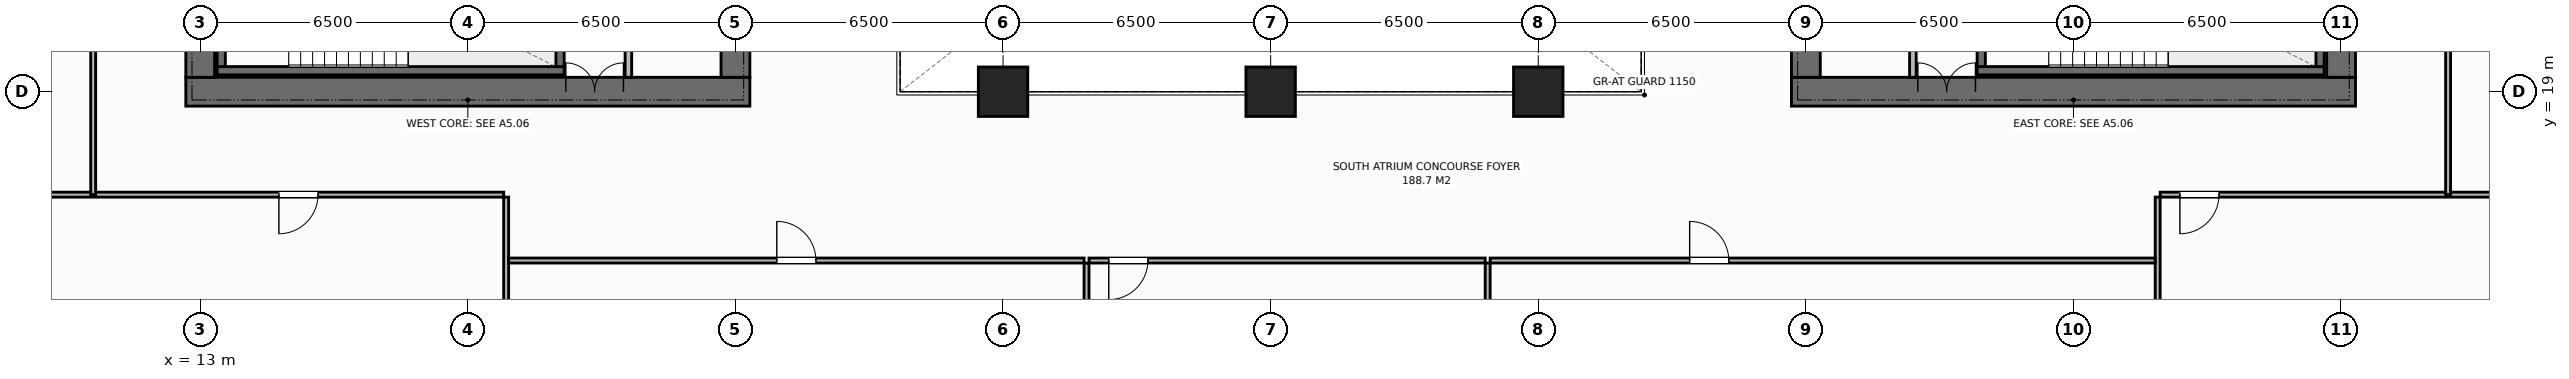
"""IFC4 building model, lengths in metres.
Left out: names, types, materials, properties, quantities, classifications, styles, units other than length and angle.
Written with IfcOpenShell. Run it as: python <this file> out.ifc"""

import sys

from ifc_helpers import new_model, si_unit, direction, frame, frame_2d, origin, origin_2d, place, context, subcontext, project, spatial, rectangle, extrude, element, fill, save


model = new_model("IFC4")
c1 = context("Model", 3, precision=1e-05, world=origin(), true_north=direction((0.0, 1.0)))
c2 = subcontext(c1, "Body", "Model", "MODEL_VIEW")
j1 = project(units=[si_unit("LENGTHUNIT", "METRE"), si_unit("PLANEANGLEUNIT", "RADIAN")], contexts=[c1])
p1 = place(None, origin())
s1 = spatial("IfcSite", under=j1, at=p1, CompositionType="ELEMENT")
p2 = place(p1, origin())
s2 = spatial("IfcBuilding", under=s1, at=p2, CompositionType="ELEMENT")
p3 = place(p2, frame((0.0, 0.0, 108.8)))
s3 = spatial("IfcBuildingStorey", under=s2, at=p3, CompositionType="ELEMENT", Elevation=108.8)
p4 = place(p3, frame((12.65, 19.0, 0.0), z_axis=(0.0, 0.0, 1.0), x_axis=(1.0, 0.0, 0.0)))
e1 = element("IfcWall", 1, at=p4, inside=s3, PredefinedType="SHEAR", context=c2, shape_type="SweptSolid", body=[
    extrude(rectangle(XDim=13.7, YDim=0.7, at=frame_2d((6.85, 0.0))), origin(), (0.0, 0.0, 1.0), 3.8),
])
p5 = place(p4, frame((9.23, 0.0, 0.0)))
e2 = element("IfcOpeningElement", 2, at=p5, cuts=e1, PredefinedType="OPENING", context=c2, shape_type="SweptSolid", body=[
    extrude(rectangle(XDim=1.4, YDim=2.2, at=frame_2d((0.7, 1.1))), frame((0.0, 0.36, 0.0), z_axis=(0.0, -1.0, 0.0), x_axis=(1.0, 0.0, 0.0)), (0.0, 0.0, 1.0), 0.72),
])
p6 = place(p3, frame((13.0, 19.35, 0.0), z_axis=(0.0, 0.0, 1.0), x_axis=(0.0, 1.0, 0.0)))
e3 = element("IfcWall", 3, at=p6, inside=s3, PredefinedType="SHEAR", context=c2, shape_type="SweptSolid", body=[
    extrude(rectangle(XDim=13.3, YDim=0.7, at=frame_2d((6.65, 0.0))), origin(), (0.0, 0.0, 1.0), 3.8),
])
p7 = place(p6, frame((4.7, 0.0, 0.0)))
e4 = element("IfcOpeningElement", 4, at=p7, cuts=e3, PredefinedType="OPENING", context=c2, shape_type="SweptSolid", body=[
    extrude(rectangle(XDim=1.4, YDim=2.2, at=frame_2d((0.7, 1.1))), frame((0.0, 0.36, 0.0), z_axis=(0.0, -1.0, 0.0), x_axis=(1.0, 0.0, 0.0)), (0.0, 0.0, 1.0), 0.72),
])
p8 = place(p3, frame((26.0, 19.35, 0.0), z_axis=(0.0, 0.0, 1.0), x_axis=(0.0, 1.0, 0.0)))
e5 = element("IfcWall", 5, at=p8, inside=s3, PredefinedType="SHEAR", context=c2, shape_type="SweptSolid", body=[
    extrude(rectangle(XDim=13.3, YDim=0.7, at=frame_2d((6.65, 0.0))), origin(), (0.0, 0.0, 1.0), 3.8),
])
p9 = place(p3, frame((51.65, 19.0, 0.0), z_axis=(0.0, 0.0, 1.0), x_axis=(1.0, 0.0, 0.0)))
e6 = element("IfcWall", 6, at=p9, inside=s3, PredefinedType="SHEAR", context=c2, shape_type="SweptSolid", body=[
    extrude(rectangle(XDim=13.7, YDim=0.7, at=frame_2d((6.85, 0.0))), origin(), (0.0, 0.0, 1.0), 3.8),
])
p10 = place(p9, frame((3.07, 0.0, 0.0)))
e7 = element("IfcOpeningElement", 7, at=p10, cuts=e6, PredefinedType="OPENING", context=c2, shape_type="SweptSolid", body=[
    extrude(rectangle(XDim=1.4, YDim=2.2, at=frame_2d((0.7, 1.1))), frame((0.0, 0.36, 0.0), z_axis=(0.0, -1.0, 0.0), x_axis=(1.0, 0.0, 0.0)), (0.0, 0.0, 1.0), 0.72),
])
p11 = place(p3, frame((52.0, 19.35, 0.0), z_axis=(0.0, 0.0, 1.0), x_axis=(0.0, 1.0, 0.0)))
e8 = element("IfcWall", 8, at=p11, inside=s3, PredefinedType="SHEAR", context=c2, shape_type="SweptSolid", body=[
    extrude(rectangle(XDim=13.3, YDim=0.7, at=frame_2d((6.65, 0.0))), origin(), (0.0, 0.0, 1.0), 3.8),
])
p12 = place(p3, frame((65.0, 19.35, 0.0), z_axis=(0.0, 0.0, 1.0), x_axis=(0.0, 1.0, 0.0)))
e9 = element("IfcWall", 9, at=p12, inside=s3, PredefinedType="SHEAR", context=c2, shape_type="SweptSolid", body=[
    extrude(rectangle(XDim=13.3, YDim=0.7, at=frame_2d((6.65, 0.0))), origin(), (0.0, 0.0, 1.0), 3.8),
])
p13 = place(p12, frame((8.1, 0.0, 0.0)))
e10 = element("IfcOpeningElement", 10, at=p13, cuts=e9, PredefinedType="OPENING", context=c2, shape_type="SweptSolid", body=[
    extrude(rectangle(XDim=1.3, YDim=2.2, at=frame_2d((0.65, 1.1))), frame((0.0, 0.36, 0.0), z_axis=(0.0, -1.0, 0.0), x_axis=(1.0, 0.0, 0.0)), (0.0, 0.0, 1.0), 0.72),
])
p14 = place(p3, frame((13.41, 19.51, 0.0), z_axis=(0.0, 0.0, 1.0), x_axis=(1.0, 0.0, 0.0)))
e11 = element("IfcWall", 11, at=p14, inside=s3, PredefinedType="SHEAR", context=c2, shape_type="SweptSolid", body=[
    extrude(rectangle(XDim=8.43, YDim=0.2, at=frame_2d((4.215, 0.0))), origin(), (0.0, 0.0, 1.0), 3.8),
])
for number, where, z_axis, x_axis in (
    (12, (13.51, 19.61, 0.0), (0.0, 0.0, 1.0), (0.0, 1.0, 0.0)),
    (13, (21.74, 19.61, 0.0), (0.0, 0.0, 1.0), (0.0, 1.0, 0.0)),
):
    element("IfcWall", number, at=place(p3, frame(where, z_axis=z_axis, x_axis=x_axis)), inside=s3, PredefinedType="SHEAR", context=c2, shape_type="SweptSolid", body=[
        extrude(rectangle(XDim=3.28, YDim=0.2, at=frame_2d((1.64, 0.0))), origin(), (0.0, 0.0, 1.0), 3.8),
    ])
p15 = place(p3, frame((56.16, 19.51, 0.0), z_axis=(0.0, 0.0, 1.0), x_axis=(1.0, 0.0, 0.0)))
e14 = element("IfcWall", 14, at=p15, inside=s3, PredefinedType="SHEAR", context=c2, shape_type="SweptSolid", body=[
    extrude(rectangle(XDim=8.43, YDim=0.2, at=frame_2d((4.215, 0.0))), origin(), (0.0, 0.0, 1.0), 3.8),
])
for number, where, z_axis, x_axis in (
    (15, (56.26, 19.61, 0.0), (0.0, 0.0, 1.0), (0.0, 1.0, 0.0)),
    (16, (64.49, 19.61, 0.0), (0.0, 0.0, 1.0), (0.0, 1.0, 0.0)),
):
    element("IfcWall", number, at=place(p3, frame(where, z_axis=z_axis, x_axis=x_axis)), inside=s3, PredefinedType="SHEAR", context=c2, shape_type="SweptSolid", body=[
        extrude(rectangle(XDim=3.28, YDim=0.2, at=frame_2d((1.64, 0.0))), origin(), (0.0, 0.0, 1.0), 3.8),
    ])
for number, where, z_axis, x_axis in (
    (17, (32.5, 19.0, 0.0), (0.0, 0.0, 1.0), (1.0, 0.0, 0.0)),
    (18, (39.0, 19.0, 0.0), (0.0, 0.0, 1.0), (1.0, 0.0, 0.0)),
    (19, (45.5, 19.0, 0.0), (0.0, 0.0, 1.0), (1.0, 0.0, 0.0)),
):
    element("IfcColumn", number, at=place(p3, frame(where, z_axis=z_axis, x_axis=x_axis)), inside=s3, PredefinedType="COLUMN", context=c2, shape_type="SweptSolid", body=[
        extrude(rectangle(XDim=1.2, YDim=1.2, at=origin_2d()), origin(), (0.0, 0.0, 1.0), 3.8),
    ])
p16 = place(p3, frame((23.4, 19.35, 0.0), z_axis=(0.0, 0.0, 1.0), x_axis=(0.0, 1.0, 0.0)))
e20 = element("IfcWall", 20, at=p16, inside=s3, PredefinedType="STANDARD", context=c2, shape_type="SweptSolid", body=[
    extrude(rectangle(XDim=13.3, YDim=0.16, at=frame_2d((6.65, 0.0))), origin(), (0.0, 0.0, 1.0), 3.565),
])
p17 = place(p16, frame((1.65, 0.0, 0.0)))
e21 = element("IfcOpeningElement", 21, at=p17, cuts=e20, PredefinedType="OPENING", context=c2, shape_type="SweptSolid", body=[
    extrude(rectangle(XDim=0.95, YDim=2.15, at=frame_2d((0.475, 1.075))), frame((0.0, 0.09, 0.0), z_axis=(0.0, -1.0, 0.0), x_axis=(1.0, 0.0, 0.0)), (0.0, 0.0, 1.0), 0.18),
])
p18 = place(p16, frame((4.95, 0.0, 0.0)))
e22 = element("IfcOpeningElement", 22, at=p18, cuts=e20, PredefinedType="OPENING", context=c2, shape_type="SweptSolid", body=[
    extrude(rectangle(XDim=1.1, YDim=2.2, at=frame_2d((0.55, 1.1))), frame((0.0, 0.09, 0.0), z_axis=(0.0, -1.0, 0.0), x_axis=(1.0, 0.0, 0.0)), (0.0, 0.0, 1.0), 0.18),
])
p19 = place(p16, frame((7.1, 0.0, 0.0)))
e23 = element("IfcOpeningElement", 23, at=p19, cuts=e20, PredefinedType="OPENING", context=c2, shape_type="SweptSolid", body=[
    extrude(rectangle(XDim=1.1, YDim=2.2, at=frame_2d((0.55, 1.1))), frame((0.0, 0.09, 0.0), z_axis=(0.0, -1.0, 0.0), x_axis=(1.0, 0.0, 0.0)), (0.0, 0.0, 1.0), 0.18),
])
p20 = place(p3, frame((54.6, 19.35, 0.0), z_axis=(0.0, 0.0, 1.0), x_axis=(0.0, 1.0, 0.0)))
e24 = element("IfcWall", 24, at=p20, inside=s3, PredefinedType="STANDARD", context=c2, shape_type="SweptSolid", body=[
    extrude(rectangle(XDim=13.3, YDim=0.16, at=frame_2d((6.65, 0.0))), origin(), (0.0, 0.0, 1.0), 3.565),
])
p21 = place(p20, frame((1.65, 0.0, 0.0)))
e25 = element("IfcOpeningElement", 25, at=p21, cuts=e24, PredefinedType="OPENING", context=c2, shape_type="SweptSolid", body=[
    extrude(rectangle(XDim=0.95, YDim=2.15, at=frame_2d((0.475, 1.075))), frame((0.0, 0.09, 0.0), z_axis=(0.0, -1.0, 0.0), x_axis=(1.0, 0.0, 0.0)), (0.0, 0.0, 1.0), 0.18),
])
p22 = place(p20, frame((4.95, 0.0, 0.0)))
e26 = element("IfcOpeningElement", 26, at=p22, cuts=e24, PredefinedType="OPENING", context=c2, shape_type="SweptSolid", body=[
    extrude(rectangle(XDim=1.1, YDim=2.2, at=frame_2d((0.55, 1.1))), frame((0.0, 0.09, 0.0), z_axis=(0.0, -1.0, 0.0), x_axis=(1.0, 0.0, 0.0)), (0.0, 0.0, 1.0), 0.18),
])
p23 = place(p20, frame((7.1, 0.0, 0.0)))
e27 = element("IfcOpeningElement", 27, at=p23, cuts=e24, PredefinedType="OPENING", context=c2, shape_type="SweptSolid", body=[
    extrude(rectangle(XDim=1.1, YDim=2.2, at=frame_2d((0.55, 1.1))), frame((0.0, 0.09, 0.0), z_axis=(0.0, -1.0, 0.0), x_axis=(1.0, 0.0, 0.0)), (0.0, 0.0, 1.0), 0.18),
])
p24 = place(p3, frame((20.431, 1.72, 0.0), z_axis=(0.0, 0.0, 1.0), x_axis=(0.0, 1.0, 0.0)))
e28 = element("IfcWall", 28, at=p24, inside=s3, PredefinedType="PARTITIONING", context=c2, shape_type="SweptSolid", body=[
    extrude(rectangle(XDim=14.72, YDim=0.12, at=frame_2d((7.36, 0.0))), origin(), (0.0, 0.0, 1.0), 3.565),
])
p25 = place(p3, frame((1.98, 16.5, 0.0), z_axis=(0.0, 0.0, 1.0), x_axis=(1.0, 0.0, 0.0)))
e29 = element("IfcWall", 29, at=p25, inside=s3, PredefinedType="PARTITIONING", context=c2, shape_type="SweptSolid", body=[
    extrude(rectangle(XDim=18.391, YDim=0.12, at=frame_2d((9.195, 0.0))), origin(), (0.0, 0.0, 1.0), 3.565),
])
p26 = place(p25, frame((12.93, 0.0, 0.0)))
e30 = element("IfcOpeningElement", 30, at=p26, cuts=e29, PredefinedType="OPENING", context=c2, shape_type="SweptSolid", body=[
    extrude(rectangle(XDim=0.95, YDim=2.15, at=frame_2d((0.475, 1.075))), frame((0.0, 0.07, 0.0), z_axis=(0.0, -1.0, 0.0), x_axis=(1.0, 0.0, 0.0)), (0.0, 0.0, 1.0), 0.14),
])
p27 = place(p3, frame((34.528, 1.72, 0.0), z_axis=(0.0, 0.0, 1.0), x_axis=(0.0, 1.0, 0.0)))
e31 = element("IfcWall", 31, at=p27, inside=s3, PredefinedType="PARTITIONING", context=c2, shape_type="SweptSolid", body=[
    extrude(rectangle(XDim=13.12, YDim=0.12, at=frame_2d((6.56, 0.0))), origin(), (0.0, 0.0, 1.0), 3.565),
])
p28 = place(p3, frame((20.491, 14.9, 0.0), z_axis=(0.0, 0.0, 1.0), x_axis=(1.0, 0.0, 0.0)))
e32 = element("IfcWall", 32, at=p28, inside=s3, PredefinedType="PARTITIONING", context=c2, shape_type="SweptSolid", body=[
    extrude(rectangle(XDim=13.977, YDim=0.12, at=frame_2d((6.989, 0.0))), origin(), (0.0, 0.0, 1.0), 3.565),
])
p29 = place(p28, frame((6.514, 0.0, 0.0)))
e33 = element("IfcOpeningElement", 33, at=p29, cuts=e32, PredefinedType="OPENING", context=c2, shape_type="SweptSolid", body=[
    extrude(rectangle(XDim=0.95, YDim=2.15, at=frame_2d((0.475, 1.075))), frame((0.0, 0.07, 0.0), z_axis=(0.0, -1.0, 0.0), x_axis=(1.0, 0.0, 0.0)), (0.0, 0.0, 1.0), 0.14),
])
p30 = place(p3, frame((44.271, 1.72, 0.0), z_axis=(0.0, 0.0, 1.0), x_axis=(0.0, 1.0, 0.0)))
e34 = element("IfcWall", 34, at=p30, inside=s3, PredefinedType="PARTITIONING", context=c2, shape_type="SweptSolid", body=[
    extrude(rectangle(XDim=13.12, YDim=0.12, at=frame_2d((6.56, 0.0))), origin(), (0.0, 0.0, 1.0), 3.565),
])
p31 = place(p3, frame((34.588, 14.9, 0.0), z_axis=(0.0, 0.0, 1.0), x_axis=(1.0, 0.0, 0.0)))
e35 = element("IfcWall", 35, at=p31, inside=s3, PredefinedType="PARTITIONING", context=c2, shape_type="SweptSolid", body=[
    extrude(rectangle(XDim=9.624, YDim=0.12, at=frame_2d((4.812, 0.0))), origin(), (0.0, 0.0, 1.0), 3.565),
])
p32 = place(p31, frame((0.48, 0.0, 0.0)))
e36 = element("IfcOpeningElement", 36, at=p32, cuts=e35, PredefinedType="OPENING", context=c2, shape_type="SweptSolid", body=[
    extrude(rectangle(XDim=0.95, YDim=2.15, at=frame_2d((0.475, 1.075))), frame((0.0, 0.07, 0.0), z_axis=(0.0, -1.0, 0.0), x_axis=(1.0, 0.0, 0.0)), (0.0, 0.0, 1.0), 0.14),
])
p33 = place(p3, frame((60.546, 1.72, 0.0), z_axis=(0.0, 0.0, 1.0), x_axis=(0.0, 1.0, 0.0)))
e37 = element("IfcWall", 37, at=p33, inside=s3, PredefinedType="PARTITIONING", context=c2, shape_type="SweptSolid", body=[
    extrude(rectangle(XDim=14.72, YDim=0.12, at=frame_2d((7.36, 0.0))), origin(), (0.0, 0.0, 1.0), 3.565),
])
p34 = place(p3, frame((44.332, 14.9, 0.0), z_axis=(0.0, 0.0, 1.0), x_axis=(1.0, 0.0, 0.0)))
e38 = element("IfcWall", 38, at=p34, inside=s3, PredefinedType="PARTITIONING", context=c2, shape_type="SweptSolid", body=[
    extrude(rectangle(XDim=16.154, YDim=0.12, at=frame_2d((8.077, 0.0))), origin(), (0.0, 0.0, 1.0), 3.565),
])
p35 = place(p34, frame((4.846, 0.0, 0.0)))
e39 = element("IfcOpeningElement", 39, at=p35, cuts=e38, PredefinedType="OPENING", context=c2, shape_type="SweptSolid", body=[
    extrude(rectangle(XDim=0.95, YDim=2.15, at=frame_2d((0.475, 1.075))), frame((0.0, 0.07, 0.0), z_axis=(0.0, -1.0, 0.0), x_axis=(1.0, 0.0, 0.0)), (0.0, 0.0, 1.0), 0.14),
])
p36 = place(p3, frame((60.606, 16.5, 0.0), z_axis=(0.0, 0.0, 1.0), x_axis=(1.0, 0.0, 0.0)))
e40 = element("IfcWall", 40, at=p36, inside=s3, PredefinedType="PARTITIONING", context=c2, shape_type="SweptSolid", body=[
    extrude(rectangle(XDim=15.414, YDim=0.12, at=frame_2d((7.707, 0.0))), origin(), (0.0, 0.0, 1.0), 3.565),
])
p37 = place(p36, frame((0.48, 0.0, 0.0)))
e41 = element("IfcOpeningElement", 41, at=p37, cuts=e40, PredefinedType="OPENING", context=c2, shape_type="SweptSolid", body=[
    extrude(rectangle(XDim=0.95, YDim=2.15, at=frame_2d((0.475, 1.075))), frame((0.0, 0.07, 0.0), z_axis=(0.0, -1.0, 0.0), x_axis=(1.0, 0.0, 0.0)), (0.0, 0.0, 1.0), 0.14),
])
p38 = place(p3, frame((10.4, 16.5, 0.0), z_axis=(0.0, 0.0, 1.0), x_axis=(0.0, 1.0, 0.0)))
e42 = element("IfcWall", 42, at=p38, inside=s3, PredefinedType="PARTITIONING", context=c2, shape_type="SweptSolid", body=[
    extrude(rectangle(XDim=9.5, YDim=0.12, at=frame_2d((4.75, 0.0))), origin(), (0.0, 0.0, 1.0), 3.565),
])
p39 = place(p38, frame((5.325, 0.0, 0.0)))
e43 = element("IfcOpeningElement", 43, at=p39, cuts=e42, PredefinedType="OPENING", context=c2, shape_type="SweptSolid", body=[
    extrude(rectangle(XDim=0.95, YDim=2.15, at=frame_2d((0.475, 1.075))), frame((0.0, 0.07, 0.0), z_axis=(0.0, -1.0, 0.0), x_axis=(1.0, 0.0, 0.0)), (0.0, 0.0, 1.0), 0.14),
])
p40 = place(p3, frame((67.6, 16.5, 0.0), z_axis=(0.0, 0.0, 1.0), x_axis=(0.0, 1.0, 0.0)))
e44 = element("IfcWall", 44, at=p40, inside=s3, PredefinedType="PARTITIONING", context=c2, shape_type="SweptSolid", body=[
    extrude(rectangle(XDim=16.9, YDim=0.12, at=frame_2d((8.45, 0.0))), origin(), (0.0, 0.0, 1.0), 3.565),
])
p41 = place(p40, frame((9.025, 0.0, 0.0)))
e45 = element("IfcOpeningElement", 45, at=p41, cuts=e44, PredefinedType="OPENING", context=c2, shape_type="SweptSolid", body=[
    extrude(rectangle(XDim=0.95, YDim=2.15, at=frame_2d((0.475, 1.075))), frame((0.0, 0.07, 0.0), z_axis=(0.0, -1.0, 0.0), x_axis=(1.0, 0.0, 0.0)), (0.0, 0.0, 1.0), 0.14),
])
p42 = place(p5, origin())
e46 = element("IfcDoor", 46, at=p42, inside=s3, OperationType="DOUBLE_DOOR_SINGLE_SWING", PredefinedType="DOOR", context=c2, shape_type="SweptSolid", body=[
    extrude(rectangle(XDim=1.4, YDim=2.2, at=frame_2d((0.7, 1.1))), frame((0.0, 0.125, 0.0), z_axis=(0.0, -1.0, 0.0), x_axis=(1.0, 0.0, 0.0)), (0.0, 0.0, 1.0), 0.05),
])
fill(e2, e46)
p43 = place(p10, origin())
e47 = element("IfcDoor", 47, at=p43, inside=s3, OperationType="DOUBLE_DOOR_SINGLE_SWING", PredefinedType="DOOR", context=c2, shape_type="SweptSolid", body=[
    extrude(rectangle(XDim=1.4, YDim=2.2, at=frame_2d((0.7, 1.1))), frame((0.0, 0.125, 0.0), z_axis=(0.0, -1.0, 0.0), x_axis=(1.0, 0.0, 0.0)), (0.0, 0.0, 1.0), 0.05),
])
fill(e7, e47)
p44 = place(p26, origin())
e48 = element("IfcDoor", 48, at=p44, inside=s3, OperationType="SINGLE_SWING_RIGHT", PredefinedType="DOOR", context=c2, shape_type="SweptSolid", body=[
    extrude(rectangle(XDim=0.95, YDim=2.15, at=frame_2d((0.475, 1.075))), frame((0.0, 0.025, 0.0), z_axis=(0.0, -1.0, 0.0), x_axis=(1.0, 0.0, 0.0)), (0.0, 0.0, 1.0), 0.05),
])
fill(e30, e48)
p45 = place(p29, origin())
e49 = element("IfcDoor", 49, at=p45, inside=s3, OperationType="SINGLE_SWING_LEFT", PredefinedType="DOOR", context=c2, shape_type="SweptSolid", body=[
    extrude(rectangle(XDim=0.95, YDim=2.15, at=frame_2d((0.475, 1.075))), frame((0.0, 0.025, 0.0), z_axis=(0.0, -1.0, 0.0), x_axis=(1.0, 0.0, 0.0)), (0.0, 0.0, 1.0), 0.05),
])
fill(e33, e49)
p46 = place(p32, origin())
e50 = element("IfcDoor", 50, at=p46, inside=s3, OperationType="SINGLE_SWING_RIGHT", PredefinedType="DOOR", context=c2, shape_type="SweptSolid", body=[
    extrude(rectangle(XDim=0.95, YDim=2.15, at=frame_2d((0.475, 1.075))), frame((0.0, 0.025, 0.0), z_axis=(0.0, -1.0, 0.0), x_axis=(1.0, 0.0, 0.0)), (0.0, 0.0, 1.0), 0.05),
])
fill(e36, e50)
p47 = place(p35, origin())
e51 = element("IfcDoor", 51, at=p47, inside=s3, OperationType="SINGLE_SWING_LEFT", PredefinedType="DOOR", context=c2, shape_type="SweptSolid", body=[
    extrude(rectangle(XDim=0.95, YDim=2.15, at=frame_2d((0.475, 1.075))), frame((0.0, 0.025, 0.0), z_axis=(0.0, -1.0, 0.0), x_axis=(1.0, 0.0, 0.0)), (0.0, 0.0, 1.0), 0.05),
])
fill(e39, e51)
p48 = place(p37, origin())
e52 = element("IfcDoor", 52, at=p48, inside=s3, OperationType="SINGLE_SWING_RIGHT", PredefinedType="DOOR", context=c2, shape_type="SweptSolid", body=[
    extrude(rectangle(XDim=0.95, YDim=2.15, at=frame_2d((0.475, 1.075))), frame((0.0, 0.025, 0.0), z_axis=(0.0, -1.0, 0.0), x_axis=(1.0, 0.0, 0.0)), (0.0, 0.0, 1.0), 0.05),
])
fill(e41, e52)
save(model, sys.argv[1])
